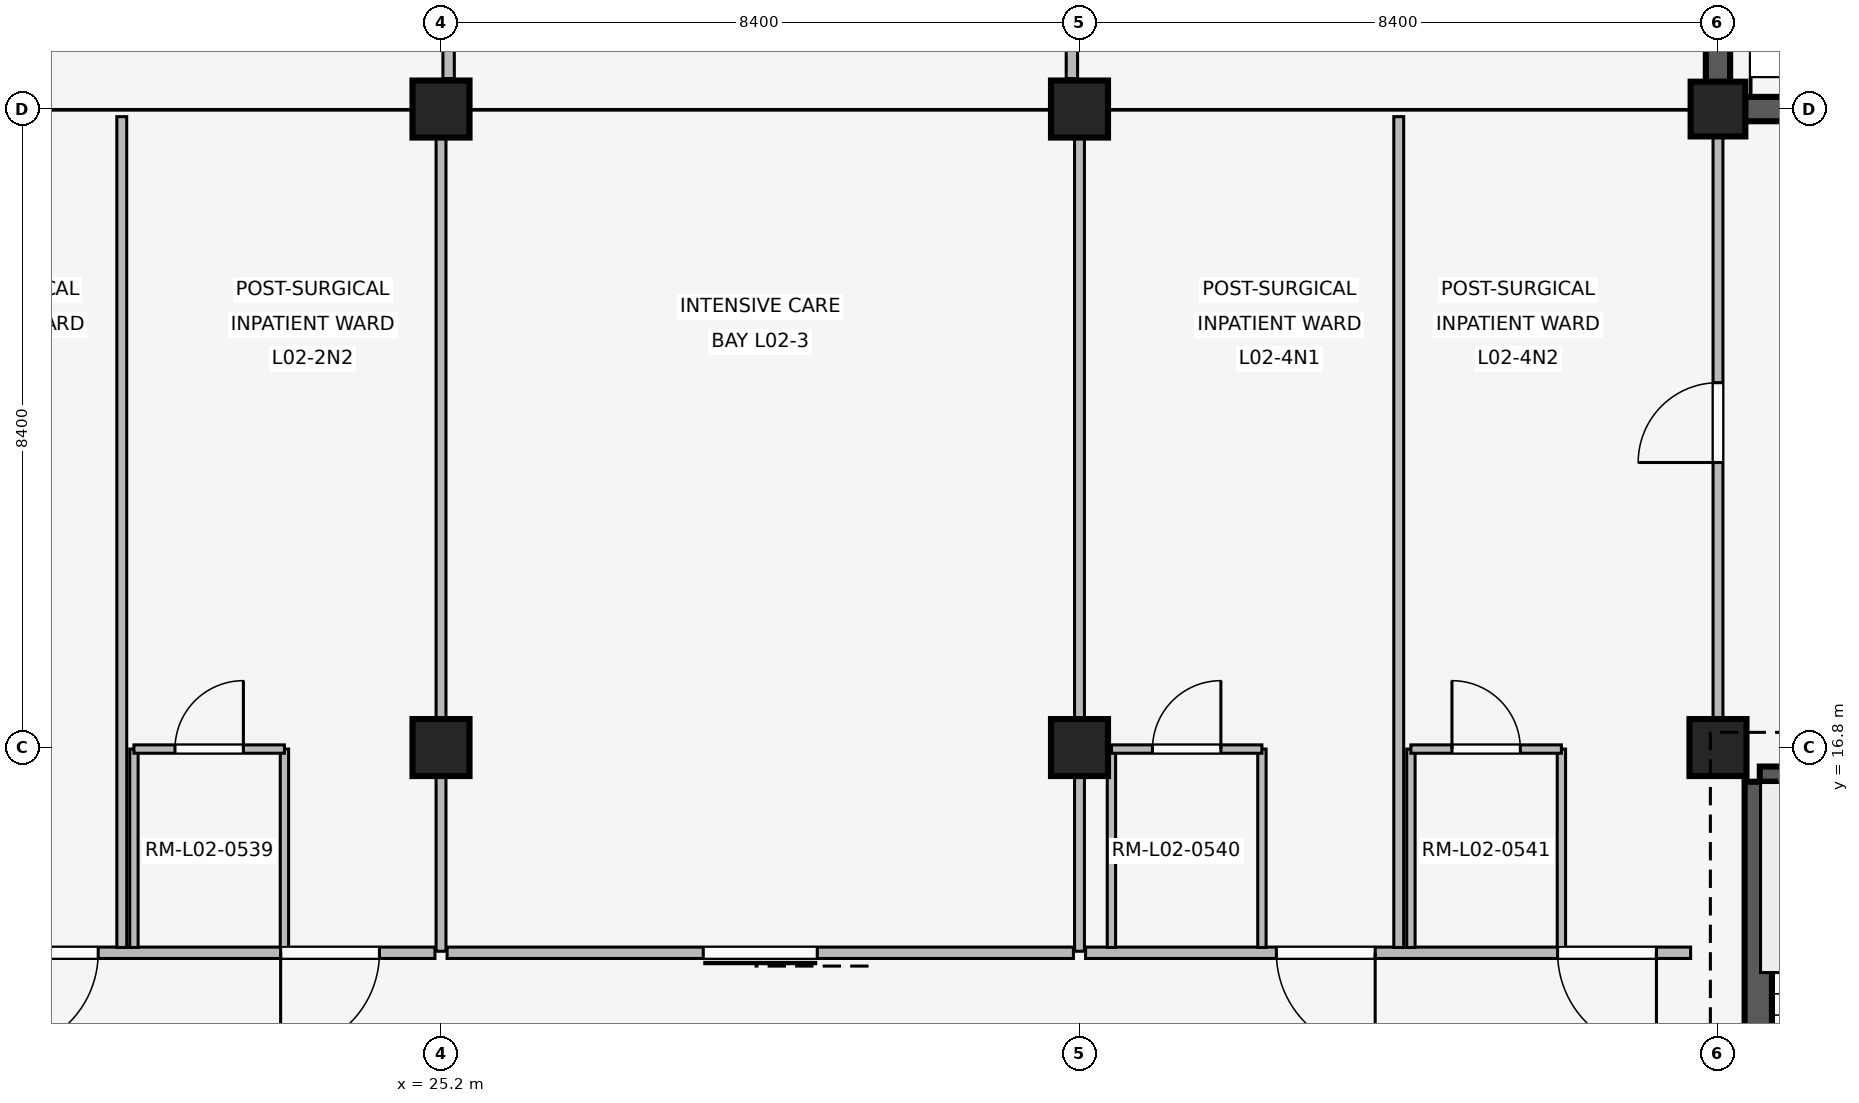
"""IFC4 building model, lengths in metres.
Left out: names, types, materials, properties, quantities, classifications, styles, units other than length and angle.
Written with IfcOpenShell. Run it as: python <this file> out.ifc"""

import sys

from ifc_helpers import new_model, si_unit, direction, frame, frame_2d, origin, origin_2d, place, context, subcontext, project, spatial, rectangle, extrude, element, fill, save


model = new_model("IFC4")
c1 = context("Model", 3, precision=1e-05, world=origin(), true_north=direction((0.0, 1.0)))
c2 = subcontext(c1, "Body", "Model", "MODEL_VIEW")
j1 = project(units=[si_unit("LENGTHUNIT", "METRE"), si_unit("PLANEANGLEUNIT", "RADIAN")], contexts=[c1])
p1 = place(None, origin())
s1 = spatial("IfcSite", under=j1, at=p1, CompositionType="ELEMENT")
p2 = place(p1, origin())
s2 = spatial("IfcBuilding", under=s1, at=p2, CompositionType="ELEMENT")
p3 = place(p2, frame((0.0, 0.0, 8.1)))
s3 = spatial("IfcBuildingStorey", under=s2, at=p3, CompositionType="ELEMENT", Elevation=8.1)
for number, where, z_axis, x_axis in (
    (1, (25.2, 16.8, 0.0), (0.0, 0.0, 1.0), (1.0, 0.0, 0.0)),
    (2, (25.2, 25.2, 0.0), (0.0, 0.0, 1.0), (1.0, 0.0, 0.0)),
    (3, (33.6, 16.8, 0.0), (0.0, 0.0, 1.0), (1.0, 0.0, 0.0)),
    (4, (33.6, 25.2, 0.0), (0.0, 0.0, 1.0), (1.0, 0.0, 0.0)),
    (5, (42.0, 16.8, 0.0), (0.0, 0.0, 1.0), (1.0, 0.0, 0.0)),
):
    element("IfcColumn", number, at=place(p3, frame(where, z_axis=z_axis, x_axis=x_axis)), inside=s3, PredefinedType="COLUMN", context=c2, shape_type="SweptSolid", body=[
        extrude(rectangle(XDim=0.75, YDim=0.75, at=origin_2d()), origin(), (0.0, 0.0, 1.0), 4.8),
    ])
p4 = place(p3, frame((42.0, 25.2, 0.0), z_axis=(0.0, 0.0, 1.0), x_axis=(1.0, 0.0, 0.0)))
e6 = element("IfcColumn", 6, at=p4, inside=s3, PredefinedType="COLUMN", context=c2, shape_type="SweptSolid", body=[
    extrude(rectangle(XDim=0.72, YDim=0.72, at=origin_2d()), origin(), (0.0, 0.0, 1.0), 4.8),
])
p5 = place(p3, frame((42.0, 33.245, 0.0), z_axis=(0.0, 0.0, 1.0), x_axis=(0.0, -1.0, 0.0)))
e7 = element("IfcWall", 7, at=p5, inside=s3, PredefinedType="SOLIDWALL", context=c2, shape_type="SweptSolid", body=[
    extrude(rectangle(XDim=7.69, YDim=0.32, at=frame_2d((3.845, 0.0))), origin(), (0.0, 0.0, 1.0), 3.86),
])
p6 = place(p5, frame((1.079, 0.0, 0.85)))
e8 = element("IfcOpeningElement", 8, at=p6, cuts=e7, PredefinedType="OPENING", context=c2, shape_type="SweptSolid", body=[
    extrude(rectangle(XDim=1.38, YDim=1.5, at=frame_2d((0.69, 0.75))), frame((0.0, 0.17, 0.0), z_axis=(0.0, -1.0, 0.0), x_axis=(1.0, 0.0, 0.0)), (0.0, 0.0, 1.0), 0.34),
])
p7 = place(p5, frame((5.231, 0.0, 0.85)))
e9 = element("IfcOpeningElement", 9, at=p7, cuts=e7, PredefinedType="OPENING", context=c2, shape_type="SweptSolid", body=[
    extrude(rectangle(XDim=1.38, YDim=1.5, at=frame_2d((0.69, 0.75))), frame((0.0, 0.17, 0.0), z_axis=(0.0, -1.0, 0.0), x_axis=(1.0, 0.0, 0.0)), (0.0, 0.0, 1.0), 0.34),
])
p8 = place(p3, frame((42.355, 25.2, 0.0), z_axis=(0.0, 0.0, 1.0), x_axis=(1.0, 0.0, 0.0)))
e10 = element("IfcWall", 10, at=p8, inside=s3, PredefinedType="SOLIDWALL", context=c2, shape_type="SweptSolid", body=[
    extrude(rectangle(XDim=7.69, YDim=0.32, at=frame_2d((3.845, 0.0))), origin(), (0.0, 0.0, 1.0), 3.86),
])
p9 = place(p8, frame((0.999, 0.0, 0.85)))
e11 = element("IfcOpeningElement", 11, at=p9, cuts=e10, PredefinedType="OPENING", context=c2, shape_type="SweptSolid", body=[
    extrude(rectangle(XDim=1.54, YDim=1.85, at=frame_2d((0.77, 0.925))), frame((0.0, 0.17, 0.0), z_axis=(0.0, -1.0, 0.0), x_axis=(1.0, 0.0, 0.0)), (0.0, 0.0, 1.0), 0.34),
])
p10 = place(p8, frame((5.151, 0.0, 0.85)))
e12 = element("IfcOpeningElement", 12, at=p10, cuts=e10, PredefinedType="OPENING", context=c2, shape_type="SweptSolid", body=[
    extrude(rectangle(XDim=1.54, YDim=1.85, at=frame_2d((0.77, 0.925))), frame((0.0, 0.17, 0.0), z_axis=(0.0, -1.0, 0.0), x_axis=(1.0, 0.0, 0.0)), (0.0, 0.0, 1.0), 0.34),
])
p11 = place(p3, frame((42.55, 16.35, 0.0), z_axis=(0.0, 0.0, 1.0), x_axis=(1.0, 0.0, 0.0)))
e13 = element("IfcWall", 13, at=p11, inside=s3, PredefinedType="SHEAR", context=c2, shape_type="SweptSolid", body=[
    extrude(rectangle(XDim=7.5, YDim=0.4, at=frame_2d((3.75, 0.0))), origin(), (0.0, 0.0, 1.0), 4.52),
])
p12 = place(p3, frame((42.55, 8.8, 0.0), z_axis=(0.0, 0.0, 1.0), x_axis=(0.0, 1.0, 0.0)))
e14 = element("IfcWall", 14, at=p12, inside=s3, PredefinedType="SHEAR", context=c2, shape_type="SweptSolid", body=[
    extrude(rectangle(XDim=7.55, YDim=0.4, at=frame_2d((3.775, 0.0))), origin(), (0.0, 0.0, 1.0), 4.52),
])
p13 = place(p12, frame((0.28, 0.0, 0.0)))
e15 = element("IfcOpeningElement", 15, at=p13, cuts=e14, PredefinedType="OPENING", context=c2, shape_type="SweptSolid", body=[
    extrude(rectangle(XDim=1.0, YDim=2.15, at=frame_2d((0.5, 1.075))), frame((0.0, 0.21, 0.0), z_axis=(0.0, -1.0, 0.0), x_axis=(1.0, 0.0, 0.0)), (0.0, 0.0, 1.0), 0.42),
])
p14 = place(p3, frame((25.12, 14.1, 0.0), z_axis=(0.0, 0.0, 1.0), x_axis=(-1.0, 0.0, 0.0)))
e16 = element("IfcWall", 16, at=p14, inside=s3, PredefinedType="PARTITIONING", context=c2, shape_type="SweptSolid", body=[
    extrude(rectangle(XDim=8.24, YDim=0.15, at=frame_2d((4.12, 0.0))), origin(), (0.0, 0.0, 1.0), 3.84),
])
p15 = place(p14, frame((0.73, 0.0, 0.0)))
e17 = element("IfcOpeningElement", 17, at=p15, cuts=e16, PredefinedType="OPENING", context=c2, shape_type="SweptSolid", body=[
    extrude(rectangle(XDim=1.3, YDim=2.25, at=frame_2d((0.65, 1.125))), frame((0.0, 0.085, 0.0), z_axis=(0.0, -1.0, 0.0), x_axis=(1.0, 0.0, 0.0)), (0.0, 0.0, 1.0), 0.17),
])
p16 = place(p14, frame((4.43, 0.0, 0.0)))
e18 = element("IfcOpeningElement", 18, at=p16, cuts=e16, PredefinedType="OPENING", context=c2, shape_type="SweptSolid", body=[
    extrude(rectangle(XDim=1.3, YDim=2.25, at=frame_2d((0.65, 1.125))), frame((0.0, 0.085, 0.0), z_axis=(0.0, -1.0, 0.0), x_axis=(1.0, 0.0, 0.0)), (0.0, 0.0, 1.0), 0.17),
])
p17 = place(p3, frame((21.0, 14.17, 0.0), z_axis=(0.0, 0.0, 1.0), x_axis=(0.0, 1.0, 0.0)))
e19 = element("IfcWall", 19, at=p17, inside=s3, PredefinedType="PARTITIONING", context=c2, shape_type="SweptSolid", body=[
    extrude(rectangle(XDim=10.93, YDim=0.13, at=frame_2d((5.465, 0.0))), origin(), (0.0, 0.0, 1.0), 3.84),
])
for number, where, z_axis, x_axis in (
    (20, (21.16, 14.17, 0.0), (0.0, 0.0, 1.0), (0.0, 1.0, 0.0)),
    (21, (23.14, 14.17, 0.0), (0.0, 0.0, 1.0), (0.0, 1.0, 0.0)),
):
    element("IfcWall", number, at=place(p3, frame(where, z_axis=z_axis, x_axis=x_axis)), inside=s3, PredefinedType="PARTITIONING", context=c2, shape_type="SweptSolid", body=[
        extrude(rectangle(XDim=2.61, YDim=0.11, at=frame_2d((1.305, 0.0))), origin(), (0.0, 0.0, 1.0), 3.84),
    ])
p18 = place(p3, frame((21.16, 16.78, 0.0), z_axis=(0.0, 0.0, 1.0), x_axis=(1.0, 0.0, 0.0)))
e22 = element("IfcWall", 22, at=p18, inside=s3, PredefinedType="PARTITIONING", context=c2, shape_type="SweptSolid", body=[
    extrude(rectangle(XDim=1.98, YDim=0.11, at=frame_2d((0.99, 0.0))), origin(), (0.0, 0.0, 1.0), 3.84),
])
p19 = place(p18, frame((0.54, 0.0, 0.0)))
e23 = element("IfcOpeningElement", 23, at=p19, cuts=e22, PredefinedType="OPENING", context=c2, shape_type="SweptSolid", body=[
    extrude(rectangle(XDim=0.9, YDim=2.1, at=frame_2d((0.45, 1.05))), frame((0.0, 0.065, 0.0), z_axis=(0.0, -1.0, 0.0), x_axis=(1.0, 0.0, 0.0)), (0.0, 0.0, 1.0), 0.13),
])
p20 = place(p3, frame((25.2, 14.12, 0.0), z_axis=(0.0, 0.0, 1.0), x_axis=(0.0, 1.0, 0.0)))
e24 = element("IfcWall", 24, at=p20, inside=s3, PredefinedType="PARTITIONING", context=c2, shape_type="SweptSolid", body=[
    extrude(rectangle(XDim=10.94, YDim=0.13, at=frame_2d((5.47, 0.0))), origin(), (0.0, 0.0, 1.0), 3.84),
])
p21 = place(p3, frame((33.52, 14.1, 0.0), z_axis=(0.0, 0.0, 1.0), x_axis=(-1.0, 0.0, 0.0)))
e25 = element("IfcWall", 25, at=p21, inside=s3, PredefinedType="PARTITIONING", context=c2, shape_type="SweptSolid", body=[
    extrude(rectangle(XDim=8.24, YDim=0.15, at=frame_2d((4.12, 0.0))), origin(), (0.0, 0.0, 1.0), 3.84),
])
p22 = place(p21, frame((3.37, 0.0, 0.0)))
e26 = element("IfcOpeningElement", 26, at=p22, cuts=e25, PredefinedType="OPENING", context=c2, shape_type="SweptSolid", body=[
    extrude(rectangle(XDim=1.5, YDim=2.3, at=frame_2d((0.75, 1.15))), frame((0.0, 0.085, 0.0), z_axis=(0.0, -1.0, 0.0), x_axis=(1.0, 0.0, 0.0)), (0.0, 0.0, 1.0), 0.17),
])
p23 = place(p3, frame((33.6, 14.12, 0.0), z_axis=(0.0, 0.0, 1.0), x_axis=(0.0, 1.0, 0.0)))
e27 = element("IfcWall", 27, at=p23, inside=s3, PredefinedType="PARTITIONING", context=c2, shape_type="SweptSolid", body=[
    extrude(rectangle(XDim=10.94, YDim=0.13, at=frame_2d((5.47, 0.0))), origin(), (0.0, 0.0, 1.0), 3.84),
])
p24 = place(p3, frame((41.64, 14.1, 0.0), z_axis=(0.0, 0.0, 1.0), x_axis=(-1.0, 0.0, 0.0)))
e28 = element("IfcWall", 28, at=p24, inside=s3, PredefinedType="PARTITIONING", context=c2, shape_type="SweptSolid", body=[
    extrude(rectangle(XDim=7.96, YDim=0.15, at=frame_2d((3.98, 0.0))), origin(), (0.0, 0.0, 1.0), 3.84),
])
p25 = place(p24, frame((0.45, 0.0, 0.0)))
e29 = element("IfcOpeningElement", 29, at=p25, cuts=e28, PredefinedType="OPENING", context=c2, shape_type="SweptSolid", body=[
    extrude(rectangle(XDim=1.3, YDim=2.25, at=frame_2d((0.65, 1.125))), frame((0.0, 0.085, 0.0), z_axis=(0.0, -1.0, 0.0), x_axis=(1.0, 0.0, 0.0)), (0.0, 0.0, 1.0), 0.17),
])
p26 = place(p24, frame((4.15, 0.0, 0.0)))
e30 = element("IfcOpeningElement", 30, at=p26, cuts=e28, PredefinedType="OPENING", context=c2, shape_type="SweptSolid", body=[
    extrude(rectangle(XDim=1.3, YDim=2.25, at=frame_2d((0.65, 1.125))), frame((0.0, 0.085, 0.0), z_axis=(0.0, -1.0, 0.0), x_axis=(1.0, 0.0, 0.0)), (0.0, 0.0, 1.0), 0.17),
])
p27 = place(p3, frame((37.8, 14.17, 0.0), z_axis=(0.0, 0.0, 1.0), x_axis=(0.0, 1.0, 0.0)))
e31 = element("IfcWall", 31, at=p27, inside=s3, PredefinedType="PARTITIONING", context=c2, shape_type="SweptSolid", body=[
    extrude(rectangle(XDim=10.93, YDim=0.13, at=frame_2d((5.465, 0.0))), origin(), (0.0, 0.0, 1.0), 3.84),
])
for number, where, z_axis, x_axis in (
    (32, (34.02, 14.17, 0.0), (0.0, 0.0, 1.0), (0.0, 1.0, 0.0)),
    (33, (36.0, 14.17, 0.0), (0.0, 0.0, 1.0), (0.0, 1.0, 0.0)),
):
    element("IfcWall", number, at=place(p3, frame(where, z_axis=z_axis, x_axis=x_axis)), inside=s3, PredefinedType="PARTITIONING", context=c2, shape_type="SweptSolid", body=[
        extrude(rectangle(XDim=2.61, YDim=0.11, at=frame_2d((1.305, 0.0))), origin(), (0.0, 0.0, 1.0), 3.84),
    ])
p28 = place(p3, frame((34.02, 16.78, 0.0), z_axis=(0.0, 0.0, 1.0), x_axis=(1.0, 0.0, 0.0)))
e34 = element("IfcWall", 34, at=p28, inside=s3, PredefinedType="PARTITIONING", context=c2, shape_type="SweptSolid", body=[
    extrude(rectangle(XDim=1.98, YDim=0.11, at=frame_2d((0.99, 0.0))), origin(), (0.0, 0.0, 1.0), 3.84),
])
p29 = place(p28, frame((0.54, 0.0, 0.0)))
e35 = element("IfcOpeningElement", 35, at=p29, cuts=e34, PredefinedType="OPENING", context=c2, shape_type="SweptSolid", body=[
    extrude(rectangle(XDim=0.9, YDim=2.1, at=frame_2d((0.45, 1.05))), frame((0.0, 0.065, 0.0), z_axis=(0.0, -1.0, 0.0), x_axis=(1.0, 0.0, 0.0)), (0.0, 0.0, 1.0), 0.13),
])
for number, where, z_axis, x_axis in (
    (36, (37.96, 14.17, 0.0), (0.0, 0.0, 1.0), (0.0, 1.0, 0.0)),
    (37, (39.94, 14.17, 0.0), (0.0, 0.0, 1.0), (0.0, 1.0, 0.0)),
):
    element("IfcWall", number, at=place(p3, frame(where, z_axis=z_axis, x_axis=x_axis)), inside=s3, PredefinedType="PARTITIONING", context=c2, shape_type="SweptSolid", body=[
        extrude(rectangle(XDim=2.61, YDim=0.11, at=frame_2d((1.305, 0.0))), origin(), (0.0, 0.0, 1.0), 3.84),
    ])
p30 = place(p3, frame((37.96, 16.78, 0.0), z_axis=(0.0, 0.0, 1.0), x_axis=(1.0, 0.0, 0.0)))
e38 = element("IfcWall", 38, at=p30, inside=s3, PredefinedType="PARTITIONING", context=c2, shape_type="SweptSolid", body=[
    extrude(rectangle(XDim=1.98, YDim=0.11, at=frame_2d((0.99, 0.0))), origin(), (0.0, 0.0, 1.0), 3.84),
])
p31 = place(p30, frame((0.54, 0.0, 0.0)))
e39 = element("IfcOpeningElement", 39, at=p31, cuts=e38, PredefinedType="OPENING", context=c2, shape_type="SweptSolid", body=[
    extrude(rectangle(XDim=0.9, YDim=2.1, at=frame_2d((0.45, 1.05))), frame((0.0, 0.065, 0.0), z_axis=(0.0, -1.0, 0.0), x_axis=(1.0, 0.0, 0.0)), (0.0, 0.0, 1.0), 0.13),
])
p32 = place(p3, frame((42.0, 17.15, 0.0), z_axis=(0.0, 0.0, 1.0), x_axis=(0.0, 1.0, 0.0)))
e40 = element("IfcWall", 40, at=p32, inside=s3, PredefinedType="PARTITIONING", context=c2, shape_type="SweptSolid", body=[
    extrude(rectangle(XDim=7.91, YDim=0.13, at=frame_2d((3.955, 0.0))), origin(), (0.0, 0.0, 1.0), 3.84),
])
p33 = place(p32, frame((3.4, 0.0, 0.0)))
e41 = element("IfcOpeningElement", 41, at=p33, cuts=e40, PredefinedType="OPENING", context=c2, shape_type="SweptSolid", body=[
    extrude(rectangle(XDim=1.05, YDim=2.2, at=frame_2d((0.525, 1.1))), frame((0.0, 0.075, 0.0), z_axis=(0.0, -1.0, 0.0), x_axis=(1.0, 0.0, 0.0)), (0.0, 0.0, 1.0), 0.15),
])
p34 = place(p3, frame((25.3, 25.6, 0.0), z_axis=(0.0, 0.0, 1.0), x_axis=(0.0, 1.0, 0.0)))
e42 = element("IfcWall", 42, at=p34, inside=s3, PredefinedType="PARTITIONING", context=c2, shape_type="SweptSolid", body=[
    extrude(rectangle(XDim=7.6, YDim=0.15, at=frame_2d((3.8, 0.0))), origin(), (0.0, 0.0, 1.0), 3.84),
])
p35 = place(p34, frame((3.0, 0.0, 0.0)))
e43 = element("IfcOpeningElement", 43, at=p35, cuts=e42, PredefinedType="OPENING", context=c2, shape_type="SweptSolid", body=[
    extrude(rectangle(XDim=1.6, YDim=2.35, at=frame_2d((0.8, 1.175))), frame((0.0, 0.085, 0.0), z_axis=(0.0, -1.0, 0.0), x_axis=(1.0, 0.0, 0.0)), (0.0, 0.0, 1.0), 0.17),
])
p36 = place(p3, frame((33.5, 25.6, 0.0), z_axis=(0.0, 0.0, 1.0), x_axis=(0.0, 1.0, 0.0)))
e44 = element("IfcWall", 44, at=p36, inside=s3, PredefinedType="PARTITIONING", context=c2, shape_type="SweptSolid", body=[
    extrude(rectangle(XDim=32.8, YDim=0.15, at=frame_2d((16.4, 0.0))), origin(), (0.0, 0.0, 1.0), 3.84),
])
p37 = place(p36, frame((3.4, 0.0, 0.0)))
e45 = element("IfcOpeningElement", 45, at=p37, cuts=e44, PredefinedType="OPENING", context=c2, shape_type="SweptSolid", body=[
    extrude(rectangle(XDim=1.5, YDim=2.3, at=frame_2d((0.75, 1.15))), frame((0.0, 0.085, 0.0), z_axis=(0.0, -1.0, 0.0), x_axis=(1.0, 0.0, 0.0)), (0.0, 0.0, 1.0), 0.17),
])
p38 = place(p15, origin())
e46 = element("IfcDoor", 46, at=p38, inside=s3, OperationType="SINGLE_SWING_RIGHT", PredefinedType="DOOR", context=c2, shape_type="SweptSolid", body=[
    extrude(rectangle(XDim=1.3, YDim=2.25, at=frame_2d((0.65, 1.125))), frame((0.0, 0.025, 0.0), z_axis=(0.0, -1.0, 0.0), x_axis=(1.0, 0.0, 0.0)), (0.0, 0.0, 1.0), 0.05),
])
fill(e17, e46)
p39 = place(p16, origin())
e47 = element("IfcDoor", 47, at=p39, inside=s3, OperationType="SINGLE_SWING_RIGHT", PredefinedType="DOOR", context=c2, shape_type="SweptSolid", body=[
    extrude(rectangle(XDim=1.3, YDim=2.25, at=frame_2d((0.65, 1.125))), frame((0.0, 0.025, 0.0), z_axis=(0.0, -1.0, 0.0), x_axis=(1.0, 0.0, 0.0)), (0.0, 0.0, 1.0), 0.05),
])
fill(e18, e47)
p40 = place(p19, origin())
e48 = element("IfcDoor", 48, at=p40, inside=s3, OperationType="SINGLE_SWING_RIGHT", PredefinedType="DOOR", context=c2, shape_type="SweptSolid", body=[
    extrude(rectangle(XDim=0.9, YDim=2.1, at=frame_2d((0.45, 1.05))), frame((0.0, 0.025, 0.0), z_axis=(0.0, -1.0, 0.0), x_axis=(1.0, 0.0, 0.0)), (0.0, 0.0, 1.0), 0.05),
])
fill(e23, e48)
p41 = place(p22, origin())
e49 = element("IfcDoor", 49, at=p41, inside=s3, OperationType="SLIDING_TO_LEFT", PredefinedType="DOOR", context=c2, shape_type="SweptSolid", body=[
    extrude(rectangle(XDim=1.5, YDim=2.3, at=frame_2d((0.75, 1.15))), frame((0.0, 0.025, 0.0), z_axis=(0.0, -1.0, 0.0), x_axis=(1.0, 0.0, 0.0)), (0.0, 0.0, 1.0), 0.05),
])
fill(e26, e49)
p42 = place(p25, origin())
e50 = element("IfcDoor", 50, at=p42, inside=s3, OperationType="SINGLE_SWING_LEFT", PredefinedType="DOOR", context=c2, shape_type="SweptSolid", body=[
    extrude(rectangle(XDim=1.3, YDim=2.25, at=frame_2d((0.65, 1.125))), frame((0.0, 0.025, 0.0), z_axis=(0.0, -1.0, 0.0), x_axis=(1.0, 0.0, 0.0)), (0.0, 0.0, 1.0), 0.05),
])
fill(e29, e50)
p43 = place(p26, origin())
e51 = element("IfcDoor", 51, at=p43, inside=s3, OperationType="SINGLE_SWING_LEFT", PredefinedType="DOOR", context=c2, shape_type="SweptSolid", body=[
    extrude(rectangle(XDim=1.3, YDim=2.25, at=frame_2d((0.65, 1.125))), frame((0.0, 0.025, 0.0), z_axis=(0.0, -1.0, 0.0), x_axis=(1.0, 0.0, 0.0)), (0.0, 0.0, 1.0), 0.05),
])
fill(e30, e51)
p44 = place(p29, origin())
e52 = element("IfcDoor", 52, at=p44, inside=s3, OperationType="SINGLE_SWING_RIGHT", PredefinedType="DOOR", context=c2, shape_type="SweptSolid", body=[
    extrude(rectangle(XDim=0.9, YDim=2.1, at=frame_2d((0.45, 1.05))), frame((0.0, 0.025, 0.0), z_axis=(0.0, -1.0, 0.0), x_axis=(1.0, 0.0, 0.0)), (0.0, 0.0, 1.0), 0.05),
])
fill(e35, e52)
p45 = place(p31, origin())
e53 = element("IfcDoor", 53, at=p45, inside=s3, OperationType="SINGLE_SWING_LEFT", PredefinedType="DOOR", context=c2, shape_type="SweptSolid", body=[
    extrude(rectangle(XDim=0.9, YDim=2.1, at=frame_2d((0.45, 1.05))), frame((0.0, 0.025, 0.0), z_axis=(0.0, -1.0, 0.0), x_axis=(1.0, 0.0, 0.0)), (0.0, 0.0, 1.0), 0.05),
])
fill(e39, e53)
p46 = place(p33, origin())
e54 = element("IfcDoor", 54, at=p46, inside=s3, OperationType="SINGLE_SWING_LEFT", PredefinedType="DOOR", context=c2, shape_type="SweptSolid", body=[
    extrude(rectangle(XDim=1.05, YDim=2.2, at=frame_2d((0.525, 1.1))), frame((0.0, 0.025, 0.0), z_axis=(0.0, -1.0, 0.0), x_axis=(1.0, 0.0, 0.0)), (0.0, 0.0, 1.0), 0.05),
])
fill(e41, e54)
save(model, sys.argv[1])
